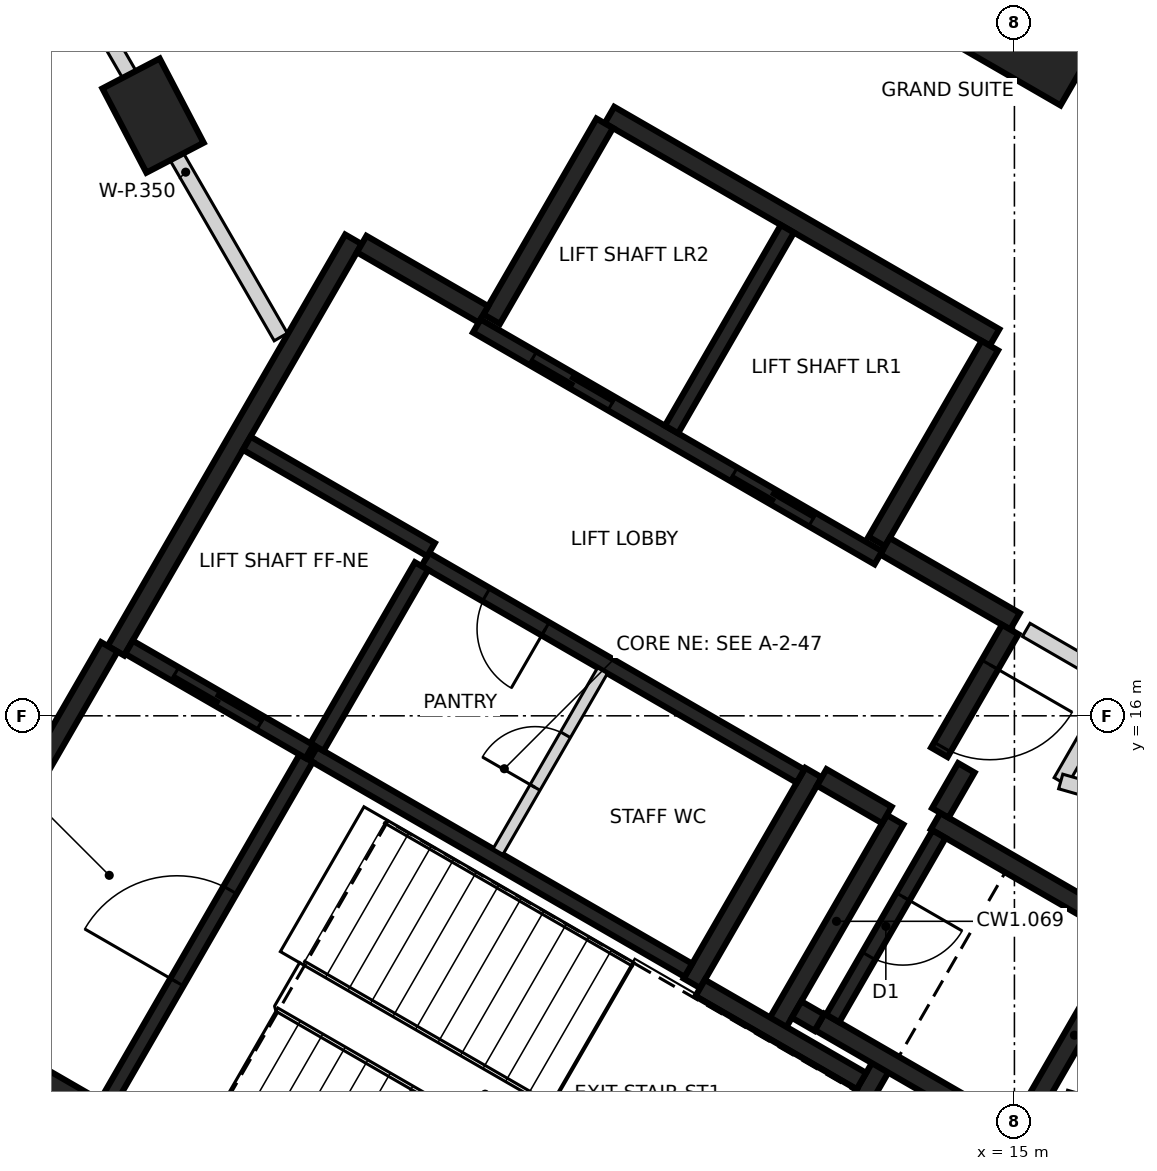
"""IFC4 building model, lengths in metres.
Left out: names, types, materials, properties, quantities, classifications, styles, units other than length and angle.
Written with IfcOpenShell. Run it as: python <this file> out.ifc"""

import sys

from ifc_helpers import new_model, si_unit, direction, frame, frame_2d, origin, origin_2d, place, context, subcontext, project, spatial, rectangle, extrude, element, fill, save


model = new_model("IFC4")
c1 = context("Model", 3, precision=1e-05, world=origin(), true_north=direction((0.0, 1.0)))
c2 = subcontext(c1, "Body", "Model", "MODEL_VIEW")
j1 = project(units=[si_unit("LENGTHUNIT", "METRE"), si_unit("PLANEANGLEUNIT", "RADIAN")], contexts=[c1])
p1 = place(None, origin())
s1 = spatial("IfcSite", under=j1, at=p1, CompositionType="ELEMENT")
p2 = place(p1, origin())
s2 = spatial("IfcBuilding", under=s1, at=p2, CompositionType="ELEMENT")
p3 = place(p2, frame((0.0, 0.0, 157.6)))
s3 = spatial("IfcBuildingStorey", under=s2, at=p3, CompositionType="ELEMENT", Elevation=157.6)
p4 = place(p3, frame((3.667, 23.896, -0.4), z_axis=(0.0, 0.0, 1.0), x_axis=(-0.463006774365, 0.886354740999, 0.0)))
e1 = element("IfcColumn", 1, at=p4, inside=s3, PredefinedType="COLUMN", context=c2, shape_type="SweptSolid", body=[
    extrude(rectangle(XDim=1.25, YDim=0.85, at=origin_2d()), origin(), (0.0, 0.0, 1.0), 3.6),
])
p5 = place(p3, frame((15.207, 26.34, -0.4), z_axis=(0.0, 0.0, 1.0), x_axis=(0.5, 0.866025403784, 0.0)))
e2 = element("IfcColumn", 2, at=p5, inside=s3, PredefinedType="COLUMN", context=c2, shape_type="SweptSolid", body=[
    extrude(rectangle(XDim=3.6, YDim=3.0, at=origin_2d()), origin(), (0.0, 0.0, 1.0), 3.6),
])
p6 = place(p3, frame((10.42, 6.498, 0.0), z_axis=(0.0, 0.0, 1.0), x_axis=(-0.866021906294, 0.500006057782, 0.0)))
e3 = element("IfcWall", 3, at=p6, inside=s3, PredefinedType="SHEAR", context=c2, shape_type="SweptSolid", body=[
    extrude(rectangle(XDim=11.55, YDim=0.25, at=frame_2d((5.775, 0.0))), origin(), (0.0, 0.0, 1.0), 3.2),
])
p7 = place(p6, frame((10.025, 0.0, 0.0)))
e4 = element("IfcOpeningElement", 4, at=p7, cuts=e3, PredefinedType="OPENING", context=c2, shape_type="SweptSolid", body=[
    extrude(rectangle(XDim=1.2, YDim=2.1, at=frame_2d((0.6, 1.05))), frame((0.0, 0.135, 0.0), z_axis=(0.0, -1.0, 0.0), x_axis=(1.0, 0.0, 0.0)), (0.0, 0.0, 1.0), 0.27),
])
p8 = place(p6, frame((8.725, 0.0, 0.0)))
e5 = element("IfcOpeningElement", 5, at=p8, cuts=e3, PredefinedType="OPENING", context=c2, shape_type="SweptSolid", body=[
    extrude(rectangle(XDim=1.2, YDim=2.1, at=frame_2d((0.6, 1.05))), frame((0.0, 0.135, 0.0), z_axis=(0.0, -1.0, 0.0), x_axis=(1.0, 0.0, 0.0)), (0.0, 0.0, 1.0), 0.27),
])
p9 = place(p3, frame((3.179, 16.856, 0.0), z_axis=(0.0, 0.0, 1.0), x_axis=(0.500004234368, 0.866022959057, 0.0)))
e6 = element("IfcWall", 6, at=p9, inside=s3, PredefinedType="SHEAR", context=c2, shape_type="SweptSolid", body=[
    extrude(rectangle(XDim=6.25, YDim=0.25, at=frame_2d((3.125, 0.0))), origin(), (0.0, 0.0, 1.0), 3.2),
])
p10 = place(p3, frame((9.673, 23.903, 0.0), z_axis=(0.0, 0.0, 1.0), x_axis=(0.86603616409, -0.499981362141, 0.0)))
e7 = element("IfcWall", 7, at=p10, inside=s3, PredefinedType="SHEAR", context=c2, shape_type="SweptSolid", body=[
    extrude(rectangle(XDim=5.85, YDim=0.25, at=frame_2d((2.925, 0.0))), origin(), (0.0, 0.0, 1.0), 3.2),
])
p11 = place(p3, frame((0.48, 12.381, 0.0), z_axis=(0.0, 0.0, 1.0), x_axis=(0.49999885962, 0.866026062182, 0.0)))
e8 = element("IfcWall", 8, at=p11, inside=s3, PredefinedType="SHEAR", context=c2, shape_type="SweptSolid", body=[
    extrude(rectangle(XDim=5.225, YDim=0.25, at=frame_2d((2.612, 0.0))), origin(), (0.0, 0.0, 1.0), 3.2),
])
p12 = place(p3, frame((13.238, 11.378, 0.0), z_axis=(0.0, 0.0, 1.0), x_axis=(-0.500008851346, -0.866020293397, 0.0)))
e9 = element("IfcWall", 9, at=p12, inside=s3, PredefinedType="SHEAR", context=c2, shape_type="SweptSolid", body=[
    extrude(rectangle(XDim=5.51, YDim=0.25, at=frame_2d((2.755, 0.0))), origin(), (0.0, 0.0, 1.0), 3.2),
])
p13 = place(p3, frame((12.357, 15.252, 0.0), z_axis=(0.0, 0.0, 1.0), x_axis=(-0.500028443584, -0.866008981251, 0.0)))
e10 = element("IfcWall", 10, at=p13, inside=s3, PredefinedType="SHEAR", context=c2, shape_type="SweptSolid", body=[
    extrude(rectangle(XDim=3.2, YDim=0.25, at=frame_2d((1.6, 0.0))), origin(), (0.0, 0.0, 1.0), 3.2),
])
for number, where, z_axis, x_axis in (
    (11, (8.123, 21.219, 0.0), (0.0, 0.0, 1.0), (0.5, 0.866, 0.0)),
    (12, (14.676, 20.87, 0.0), (0.0, 0.0, 1.0), (-0.5, -0.866, 0.0)),
):
    element("IfcWall", number, at=place(p3, frame(where, z_axis=z_axis, x_axis=x_axis)), inside=s3, PredefinedType="SHEAR", context=c2, shape_type="SweptSolid", body=[
        extrude(rectangle(XDim=2.975, YDim=0.25, at=frame_2d((1.487, 0.0))), origin(), (0.0, 0.0, 1.0), 3.2),
    ])
p14 = place(p3, frame((16.552, 13.119, 0.0), z_axis=(0.0, 0.0, 1.0), x_axis=(-0.499978833458, -0.866037623948, 0.0)))
e13 = element("IfcWall", 13, at=p14, inside=s3, PredefinedType="SHEAR", context=c2, shape_type="SweptSolid", body=[
    extrude(rectangle(XDim=3.05, YDim=0.25, at=frame_2d((1.525, 0.0))), origin(), (0.0, 0.0, 1.0), 3.2),
])
p15 = place(p3, frame((14.918, 10.54, 0.0), z_axis=(0.0, 0.0, 1.0), x_axis=(-0.866063538972, 0.499933942099, 0.0)))
e14 = element("IfcWall", 14, at=p15, inside=s3, PredefinedType="SHEAR", context=c2, shape_type="SweptSolid", body=[
    extrude(rectangle(XDim=2.865, YDim=0.25, at=frame_2d((1.432, 0.0))), origin(), (0.0, 0.0, 1.0), 3.2),
])
p16 = place(p3, frame((13.963, 14.614, 0.0), z_axis=(0.0, 0.0, 1.0), x_axis=(0.866042235819, -0.499970844928, 0.0)))
e15 = element("IfcWall", 15, at=p16, inside=s3, PredefinedType="SHEAR", context=c2, shape_type="SweptSolid", body=[
    extrude(rectangle(XDim=2.865, YDim=0.25, at=frame_2d((1.432, 0.0))), origin(), (0.0, 0.0, 1.0), 3.2),
])
p17 = place(p3, frame((11.888, 11.961, 0.0), z_axis=(0.0, 0.0, 1.0), x_axis=(0.500003324108, 0.866023484601, 0.0)))
e16 = element("IfcWall", 16, at=p17, inside=s3, PredefinedType="SHEAR", context=c2, shape_type="SweptSolid", body=[
    extrude(rectangle(XDim=3.085, YDim=0.25, at=frame_2d((1.542, 0.0))), origin(), (0.0, 0.0, 1.0), 3.2),
])
p18 = place(p3, frame((10.865, 12.418, 0.0), z_axis=(0.0, 0.0, 1.0), x_axis=(0.866026229868, -0.499998569178, 0.0)))
e17 = element("IfcWall", 17, at=p18, inside=s3, PredefinedType="SHEAR", context=c2, shape_type="SweptSolid", body=[
    extrude(rectangle(XDim=2.449, YDim=0.25, at=frame_2d((1.225, 0.0))), origin(), (0.0, 0.0, 1.0), 3.2),
])
p19 = place(p3, frame((13.297, 18.231, 0.0), z_axis=(0.0, 0.0, 1.0), x_axis=(0.866043531843, -0.499968599967, 0.0)))
e18 = element("IfcWall", 18, at=p19, inside=s3, PredefinedType="SHEAR", context=c2, shape_type="SweptSolid", body=[
    extrude(rectangle(XDim=1.975, YDim=0.25, at=frame_2d((0.987, 0.0))), origin(), (0.0, 0.0, 1.0), 3.2),
])
p20 = place(p3, frame((6.413, 22.206, 0.0), z_axis=(0.0, 0.0, 1.0), x_axis=(0.866016279763, -0.500015802937, 0.0)))
e19 = element("IfcWall", 19, at=p20, inside=s3, PredefinedType="SHEAR", context=c2, shape_type="SweptSolid", body=[
    extrude(rectangle(XDim=1.849, YDim=0.25, at=frame_2d((0.925, 0.0))), origin(), (0.0, 0.0, 1.0), 3.2),
])
p21 = place(p3, frame((14.945, 17.135, 0.0), z_axis=(0.0, 0.0, 1.0), x_axis=(-0.499983108224, -0.866035156036, 0.0)))
e20 = element("IfcWall", 20, at=p21, inside=s3, PredefinedType="SHEAR", context=c2, shape_type="SweptSolid", body=[
    extrude(rectangle(XDim=1.865, YDim=0.25, at=frame_2d((0.932, 0.0))), origin(), (0.0, 0.0, 1.0), 3.2),
])
p22 = place(p21, frame((0.535, 0.0, 0.0)))
e21 = element("IfcOpeningElement", 21, at=p22, cuts=e20, PredefinedType="OPENING", context=c2, shape_type="SweptSolid", body=[
    extrude(rectangle(XDim=1.25, YDim=2.1, at=frame_2d((0.625, 1.05))), frame((0.0, 0.135, 0.0), z_axis=(0.0, -1.0, 0.0), x_axis=(1.0, 0.0, 0.0)), (0.0, 0.0, 1.0), 0.27),
])
p23 = place(p3, frame((13.322, 14.695, 0.0), z_axis=(0.0, 0.0, 1.0), x_axis=(-0.866017078145, 0.500014420154, 0.0)))
e22 = element("IfcWall", 22, at=p23, inside=s3, PredefinedType="SHEAR", context=c2, shape_type="SweptSolid", body=[
    extrude(rectangle(XDim=0.989, YDim=0.25, at=frame_2d((0.495, 0.0))), origin(), (0.0, 0.0, 1.0), 3.2),
])
p24 = place(p3, frame((14.368, 15.315, 0.0), z_axis=(0.0, 0.0, 1.0), x_axis=(-0.499897359611, -0.866084655132, 0.0)))
e23 = element("IfcWall", 23, at=p24, inside=s3, PredefinedType="SHEAR", context=c2, shape_type="SweptSolid", body=[
    extrude(rectangle(XDim=0.685, YDim=0.25, at=frame_2d((0.342, 0.0))), origin(), (0.0, 0.0, 1.0), 3.2),
])
p25 = place(p3, frame((12.433, 11.964, 0.0), z_axis=(0.0, 0.0, 1.0), x_axis=(-0.866055875208, 0.499947218231, 0.0)))
e24 = element("IfcWall", 24, at=p25, inside=s3, PredefinedType="SHEAR", context=c2, shape_type="SweptSolid", body=[
    extrude(rectangle(XDim=0.345, YDim=0.25, at=frame_2d((0.172, 0.0))), origin(), (0.0, 0.0, 1.0), 3.2),
])
p26 = place(p3, frame((13.21, 18.08, 0.0), z_axis=(0.0, 0.0, 1.0), x_axis=(-0.866030299012, 0.499991521122, 0.0)))
e25 = element("IfcWall", 25, at=p26, inside=s3, PredefinedType="SHEAR", context=c2, shape_type="SweptSolid", body=[
    extrude(rectangle(XDim=6.1, YDim=0.2, at=frame_2d((3.05, 0.0))), origin(), (0.0, 0.0, 1.0), 3.2),
])
p27 = place(p26, frame((1.0, 0.0, 0.0)))
e26 = element("IfcOpeningElement", 26, at=p27, cuts=e25, PredefinedType="OPENING", context=c2, shape_type="SweptSolid", body=[
    extrude(rectangle(XDim=1.2, YDim=2.1, at=frame_2d((0.6, 1.05))), frame((0.0, 0.11, 0.0), z_axis=(0.0, -1.0, 0.0), x_axis=(1.0, 0.0, 0.0)), (0.0, 0.0, 1.0), 0.22),
])
p28 = place(p26, frame((4.05, 0.0, 0.0)))
e27 = element("IfcOpeningElement", 27, at=p28, cuts=e25, PredefinedType="OPENING", context=c2, shape_type="SweptSolid", body=[
    extrude(rectangle(XDim=1.2, YDim=2.1, at=frame_2d((0.6, 1.05))), frame((0.0, 0.11, 0.0), z_axis=(0.0, -1.0, 0.0), x_axis=(1.0, 0.0, 0.0)), (0.0, 0.0, 1.0), 0.22),
])
p29 = place(p3, frame((5.775, 15.502, 0.0), z_axis=(0.0, 0.0, 1.0), x_axis=(0.866020080793, -0.500009219579, 0.0)))
e28 = element("IfcWall", 28, at=p29, inside=s3, PredefinedType="SHEAR", context=c2, shape_type="SweptSolid", body=[
    extrude(rectangle(XDim=5.699, YDim=0.2, at=frame_2d((2.85, 0.0))), origin(), (0.0, 0.0, 1.0), 3.2),
])
p30 = place(p3, frame((12.185, 15.207, 0.0), z_axis=(0.0, 0.0, 1.0), x_axis=(-0.866020080793, 0.500009219579, 0.0)))
e29 = element("IfcWall", 29, at=p30, inside=s3, PredefinedType="SHEAR", context=c2, shape_type="SweptSolid", body=[
    extrude(rectangle(XDim=5.699, YDim=0.2, at=frame_2d((2.85, 0.0))), origin(), (0.0, 0.0, 1.0), 3.2),
])
p31 = place(p30, frame((3.874, 0.0, 0.0)))
e30 = element("IfcOpeningElement", 30, at=p31, cuts=e29, PredefinedType="OPENING", context=c2, shape_type="SweptSolid", body=[
    extrude(rectangle(XDim=0.9, YDim=2.1, at=frame_2d((0.45, 1.05))), frame((0.0, 0.11, 0.0), z_axis=(0.0, -1.0, 0.0), x_axis=(1.0, 0.0, 0.0)), (0.0, 0.0, 1.0), 0.22),
])
p32 = place(p3, frame((3.057, 10.895, 0.0), z_axis=(0.0, 0.0, 1.0), x_axis=(0.499989418164, 0.866031513124, 0.0)))
e31 = element("IfcWall", 31, at=p32, inside=s3, PredefinedType="SHEAR", context=c2, shape_type="SweptSolid", body=[
    extrude(rectangle(XDim=5.251, YDim=0.2, at=frame_2d((2.625, 0.0))), origin(), (0.0, 0.0, 1.0), 3.2),
])
p33 = place(p32, frame((1.849, 0.0, 0.0)))
e32 = element("IfcOpeningElement", 32, at=p33, cuts=e31, PredefinedType="OPENING", context=c2, shape_type="SweptSolid", body=[
    extrude(rectangle(XDim=1.4, YDim=2.1, at=frame_2d((0.7, 1.05))), frame((0.0, 0.11, 0.0), z_axis=(0.0, -1.0, 0.0), x_axis=(1.0, 0.0, 0.0)), (0.0, 0.0, 1.0), 0.22),
])
p34 = place(p3, frame((10.489, 19.767, 0.0), z_axis=(0.0, 0.0, 1.0), x_axis=(0.499946628782, 0.866056215479, 0.0)))
e33 = element("IfcWall", 33, at=p34, inside=s3, PredefinedType="SHEAR", context=c2, shape_type="SweptSolid", body=[
    extrude(rectangle(XDim=3.048, YDim=0.2, at=frame_2d((1.524, 0.0))), origin(), (0.0, 0.0, 1.0), 3.2),
])
p35 = place(p3, frame((14.008, 14.442, 0.0), z_axis=(0.0, 0.0, 1.0), x_axis=(-0.499986818241, -0.866033014143, 0.0)))
e34 = element("IfcWall", 34, at=p35, inside=s3, PredefinedType="SHEAR", context=c2, shape_type="SweptSolid", body=[
    extrude(rectangle(XDim=2.798, YDim=0.2, at=frame_2d((1.399, 0.0))), origin(), (0.0, 0.0, 1.0), 3.2),
])
p36 = place(p35, frame((0.949, 0.0, 0.0)))
e35 = element("IfcOpeningElement", 35, at=p36, cuts=e34, PredefinedType="OPENING", context=c2, shape_type="SweptSolid", body=[
    extrude(rectangle(XDim=0.9, YDim=2.1, at=frame_2d((0.45, 1.05))), frame((0.0, 0.11, 0.0), z_axis=(0.0, -1.0, 0.0), x_axis=(1.0, 0.0, 0.0)), (0.0, 0.0, 1.0), 0.22),
])
p37 = place(p3, frame((7.199, 17.97, 0.0), z_axis=(0.0, 0.0, 1.0), x_axis=(-0.499968400327, -0.866043647095, 0.0)))
e36 = element("IfcWall", 36, at=p37, inside=s3, PredefinedType="SHEAR", context=c2, shape_type="SweptSolid", body=[
    extrude(rectangle(XDim=2.75, YDim=0.2, at=frame_2d((1.375, 0.0))), origin(), (0.0, 0.0, 1.0), 3.2),
])
p38 = place(p3, frame((5.725, 15.531, 0.0), z_axis=(0.0, 0.0, 1.0), x_axis=(-0.866037306777, 0.499979382845, 0.0)))
e37 = element("IfcWall", 37, at=p38, inside=s3, PredefinedType="SHEAR", context=c2, shape_type="SweptSolid", body=[
    extrude(rectangle(XDim=2.742, YDim=0.2, at=frame_2d((1.371, 0.0))), origin(), (0.0, 0.0, 1.0), 3.2),
])
p39 = place(p38, frame((0.743, 0.0, 0.0)))
e38 = element("IfcOpeningElement", 38, at=p39, cuts=e37, PredefinedType="OPENING", context=c2, shape_type="SweptSolid", body=[
    extrude(rectangle(XDim=1.3, YDim=2.1, at=frame_2d((0.65, 1.05))), frame((0.0, 0.11, 0.0), z_axis=(0.0, -1.0, 0.0), x_axis=(1.0, 0.0, 0.0)), (0.0, 0.0, 1.0), 0.22),
])
p40 = place(p3, frame((4.901, 19.586, 0.0), z_axis=(0.0, 0.0, 1.0), x_axis=(0.866022890907, -0.500004352405, 0.0)))
e39 = element("IfcWall", 39, at=p40, inside=s3, PredefinedType="SHEAR", context=c2, shape_type="SweptSolid", body=[
    extrude(rectangle(XDim=2.799, YDim=0.2, at=frame_2d((1.399, 0.0))), origin(), (0.0, 0.0, 1.0), 3.2),
])
p41 = place(p3, frame((8.207, 14.214, 0.0), z_axis=(0.0, 0.0, 1.0), x_axis=(0.499922376475, 0.866070215109, 0.0)))
e40 = element("IfcWall", 40, at=p41, inside=s3, PredefinedType="PARTITIONING", context=c2, shape_type="SweptSolid", body=[
    extrude(rectangle(XDim=2.749, YDim=0.15, at=frame_2d((1.374, 0.0))), origin(), (0.0, 0.0, 1.0), 3.2),
])
p42 = place(p41, frame((0.974, 0.0, 0.0)))
e41 = element("IfcOpeningElement", 41, at=p42, cuts=e40, PredefinedType="OPENING", context=c2, shape_type="SweptSolid", body=[
    extrude(rectangle(XDim=0.8, YDim=2.1, at=frame_2d((0.4, 1.05))), frame((0.0, 0.085, 0.0), z_axis=(0.0, -1.0, 0.0), x_axis=(1.0, 0.0, 0.0)), (0.0, 0.0, 1.0), 0.17),
])
p43 = place(p3, frame((15.156, 17.13, 0.0), z_axis=(0.0, 0.0, 1.0), x_axis=(0.865755062894, -0.500467952093, 0.0)))
e42 = element("IfcWall", 42, at=p43, inside=s3, PredefinedType="PARTITIONING", context=c2, shape_type="SweptSolid", body=[
    extrude(rectangle(XDim=1.389, YDim=0.2, at=frame_2d((0.694, 0.0))), origin(), (0.0, 0.0, 1.0), 3.2),
])
p44 = place(p3, frame((15.609, 15.136, 0.0), z_axis=(0.0, 0.0, 1.0), x_axis=(0.499501622561, 0.866312950993, 0.0)))
e43 = element("IfcWall", 43, at=p44, inside=s3, PredefinedType="PARTITIONING", context=c2, shape_type="SweptSolid", body=[
    extrude(rectangle(XDim=1.5, YDim=0.2, at=frame_2d((0.75, 0.0))), origin(), (0.0, 0.0, 1.0), 3.2),
])
p45 = place(p3, frame((15.609, 15.136, 0.0), z_axis=(0.0, 0.0, 1.0), x_axis=(0.961662011825, -0.274237442763, 0.0)))
e44 = element("IfcWall", 44, at=p45, inside=s3, PredefinedType="PARTITIONING", context=c2, shape_type="SweptSolid", body=[
    extrude(rectangle(XDim=1.2, YDim=0.2, at=frame_2d((0.6, 0.0))), origin(), (0.0, 0.0, 1.0), 3.2),
])
p46 = place(p3, frame((15.672, 10.978, 0.0), z_axis=(0.0, 0.0, 1.0), x_axis=(0.961612403256, -0.274411344344, 0.0)))
e45 = element("IfcWall", 45, at=p46, inside=s3, PredefinedType="PARTITIONING", context=c2, shape_type="SweptSolid", body=[
    extrude(rectangle(XDim=0.937, YDim=0.2, at=frame_2d((0.468, 0.0))), origin(), (0.0, 0.0, 1.0), 3.2),
])
p47 = place(p3, frame((2.845, 25.321, 0.0), z_axis=(0.0, 0.0, 1.0), x_axis=(0.499751996305, -0.866168541445, 0.0)))
e46 = element("IfcWall", 46, at=p47, inside=s3, PredefinedType="PARTITIONING", context=c2, shape_type="SweptSolid", body=[
    extrude(rectangle(XDim=5.008, YDim=0.2, at=frame_2d((2.504, 0.0))), origin(), (0.0, 0.0, 1.0), 3.2),
])
p48 = place(p39, origin())
e47 = element("IfcDoor", 47, at=p48, inside=s3, OperationType="SLIDING_TO_LEFT", PredefinedType="DOOR", context=c2, shape_type="SweptSolid", body=[
    extrude(rectangle(XDim=1.3, YDim=2.1, at=frame_2d((0.65, 1.05))), frame((0.0, 0.025, 0.0), z_axis=(0.0, -1.0, 0.0), x_axis=(1.0, 0.0, 0.0)), (0.0, 0.0, 1.0), 0.05),
])
fill(e38, e47)
p49 = place(p27, origin())
e48 = element("IfcDoor", 48, at=p49, inside=s3, OperationType="DOUBLE_DOOR_SLIDING", PredefinedType="DOOR", context=c2, shape_type="SweptSolid", body=[
    extrude(rectangle(XDim=1.2, YDim=2.1, at=frame_2d((0.6, 1.05))), frame((0.0, 0.025, 0.0), z_axis=(0.0, -1.0, 0.0), x_axis=(1.0, 0.0, 0.0)), (0.0, 0.0, 1.0), 0.05),
])
fill(e26, e48)
p50 = place(p28, origin())
e49 = element("IfcDoor", 49, at=p50, inside=s3, OperationType="DOUBLE_DOOR_SLIDING", PredefinedType="DOOR", context=c2, shape_type="SweptSolid", body=[
    extrude(rectangle(XDim=1.2, YDim=2.1, at=frame_2d((0.6, 1.05))), frame((0.0, 0.025, 0.0), z_axis=(0.0, -1.0, 0.0), x_axis=(1.0, 0.0, 0.0)), (0.0, 0.0, 1.0), 0.05),
])
fill(e27, e49)
p51 = place(p22, origin())
e50 = element("IfcDoor", 50, at=p51, inside=s3, OperationType="SINGLE_SWING_LEFT", PredefinedType="DOOR", context=c2, shape_type="SweptSolid", body=[
    extrude(rectangle(XDim=1.25, YDim=2.1, at=frame_2d((0.625, 1.05))), frame((0.0, 0.025, 0.0), z_axis=(0.0, -1.0, 0.0), x_axis=(1.0, 0.0, 0.0)), (0.0, 0.0, 1.0), 0.05),
])
fill(e21, e50)
p52 = place(p8, origin())
e51 = element("IfcDoor", 51, at=p52, inside=s3, OperationType="SINGLE_SWING_RIGHT", PredefinedType="DOOR", context=c2, shape_type="SweptSolid", body=[
    extrude(rectangle(XDim=1.2, YDim=2.1, at=frame_2d((0.6, 1.05))), frame((0.0, 0.025, 0.0), z_axis=(0.0, -1.0, 0.0), x_axis=(1.0, 0.0, 0.0)), (0.0, 0.0, 1.0), 0.05),
])
fill(e5, e51)
p53 = place(p33, origin())
e52 = element("IfcDoor", 52, at=p53, inside=s3, OperationType="SINGLE_SWING_LEFT", PredefinedType="DOOR", context=c2, shape_type="SweptSolid", body=[
    extrude(rectangle(XDim=1.4, YDim=2.1, at=frame_2d((0.7, 1.05))), frame((0.0, 0.025, 0.0), z_axis=(0.0, -1.0, 0.0), x_axis=(1.0, 0.0, 0.0)), (0.0, 0.0, 1.0), 0.05),
])
fill(e32, e52)
p54 = place(p31, origin())
e53 = element("IfcDoor", 53, at=p54, inside=s3, OperationType="SINGLE_SWING_RIGHT", PredefinedType="DOOR", context=c2, shape_type="SweptSolid", body=[
    extrude(rectangle(XDim=0.9, YDim=2.1, at=frame_2d((0.45, 1.05))), frame((0.0, 0.025, 0.0), z_axis=(0.0, -1.0, 0.0), x_axis=(1.0, 0.0, 0.0)), (0.0, 0.0, 1.0), 0.05),
])
fill(e30, e53)
p55 = place(p36, origin())
e54 = element("IfcDoor", 54, at=p55, inside=s3, OperationType="SINGLE_SWING_LEFT", PredefinedType="DOOR", context=c2, shape_type="SweptSolid", body=[
    extrude(rectangle(XDim=0.9, YDim=2.1, at=frame_2d((0.45, 1.05))), frame((0.0, 0.025, 0.0), z_axis=(0.0, -1.0, 0.0), x_axis=(1.0, 0.0, 0.0)), (0.0, 0.0, 1.0), 0.05),
])
fill(e35, e54)
p56 = place(p42, origin())
e55 = element("IfcDoor", 55, at=p56, inside=s3, OperationType="SINGLE_SWING_RIGHT", PredefinedType="DOOR", context=c2, shape_type="SweptSolid", body=[
    extrude(rectangle(XDim=0.8, YDim=2.1, at=frame_2d((0.4, 1.05))), frame((0.0, 0.025, 0.0), z_axis=(0.0, -1.0, 0.0), x_axis=(1.0, 0.0, 0.0)), (0.0, 0.0, 1.0), 0.05),
])
fill(e41, e55)
save(model, sys.argv[1])
